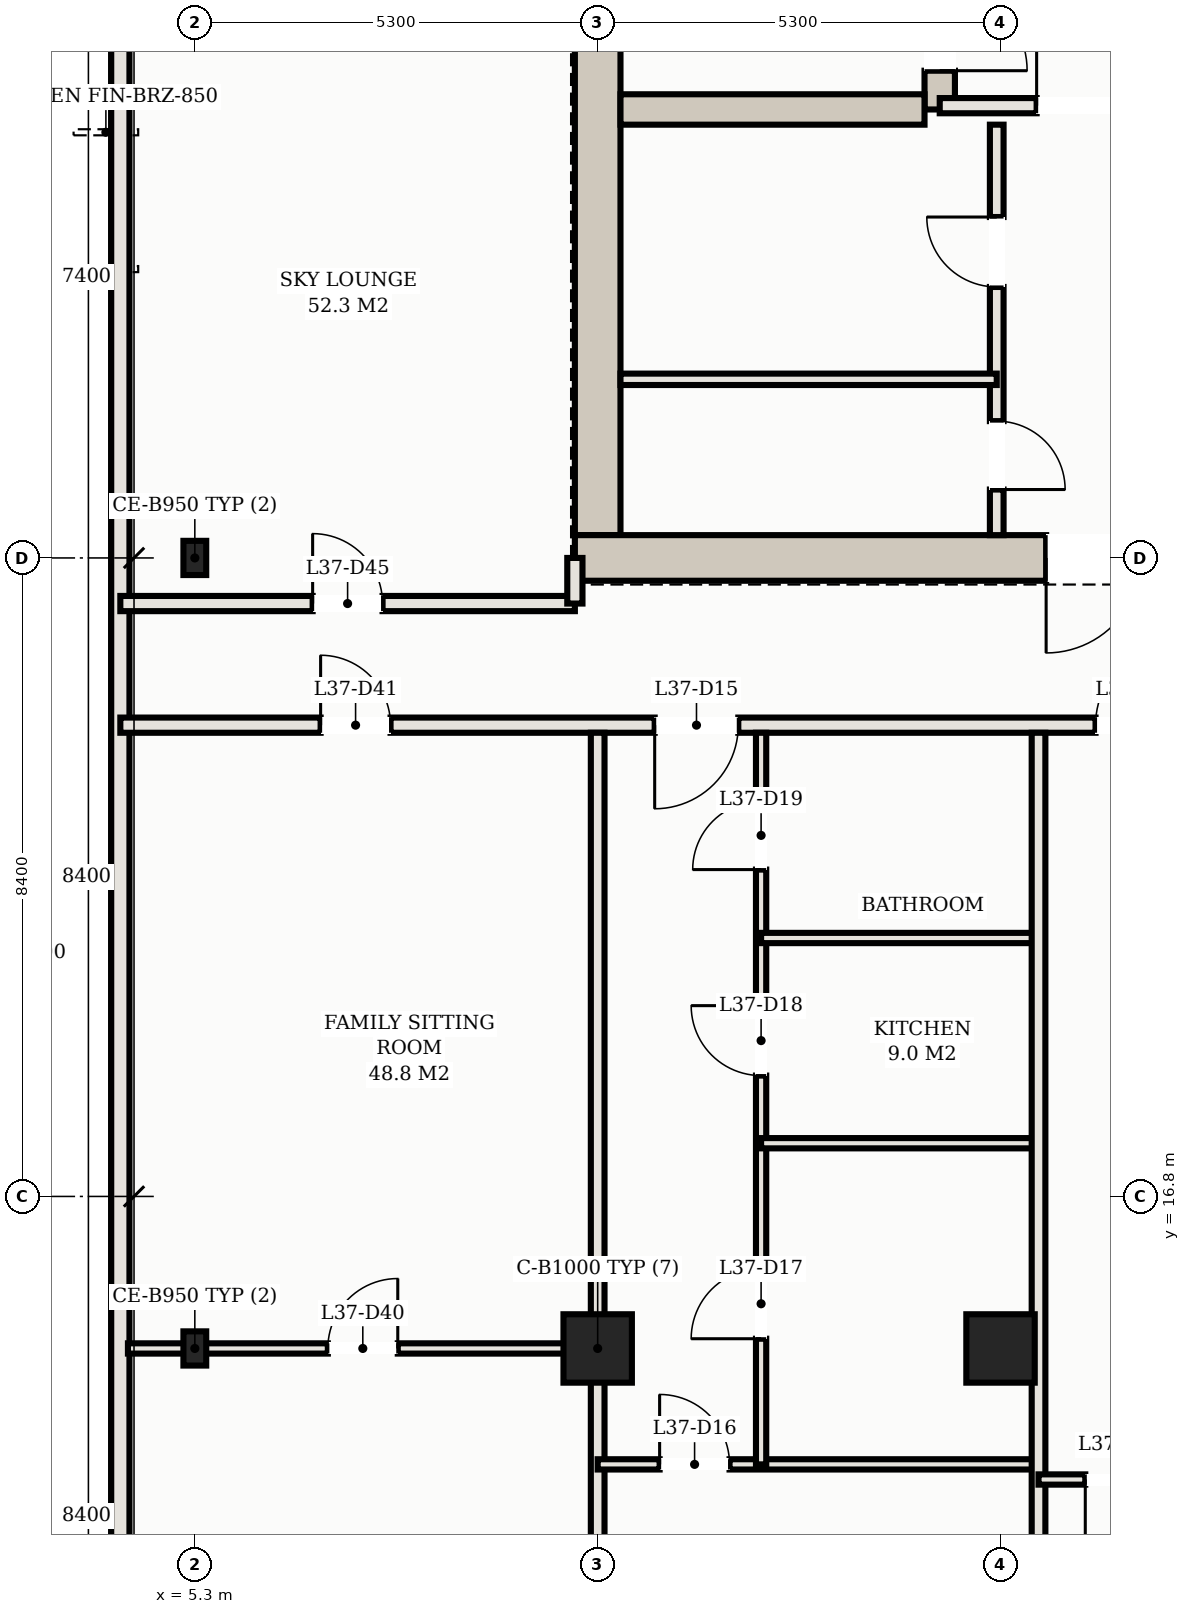
"""IFC4 building model, lengths in metres.
Left out: names, types, materials, properties, quantities, classifications, styles, units other than length and angle.
Written with IfcOpenShell. Run it as: python <this file> out.ifc"""

import sys

from ifc_helpers import new_model, si_unit, direction, frame, frame_2d, origin, origin_2d, place, context, subcontext, project, spatial, rectangle, hollow_rectangle, extrude, element, fill, save


model = new_model("IFC4")
c1 = context("Model", 3, precision=1e-05, world=origin(), true_north=direction((0.0, 1.0)))
c2 = subcontext(c1, "Body", "Model", "MODEL_VIEW")
j1 = project(units=[si_unit("LENGTHUNIT", "METRE"), si_unit("PLANEANGLEUNIT", "RADIAN")], contexts=[c1])
p1 = place(None, origin())
s1 = spatial("IfcSite", under=j1, at=p1, CompositionType="ELEMENT")
p2 = place(p1, origin())
s2 = spatial("IfcBuilding", under=s1, at=p2, CompositionType="ELEMENT")
p3 = place(p2, frame((0.0, 0.0, 139.2)))
s3 = spatial("IfcBuildingStorey", under=s2, at=p3, CompositionType="ELEMENT", Elevation=139.2)
p4 = place(p3, frame((10.6, 25.5, 0.0), z_axis=(0.0, 0.0, 1.0), x_axis=(0.0, 1.0, 0.0)))
e1 = element("IfcWall", 1, at=p4, inside=s3, PredefinedType="SHEAR", context=c2, shape_type="SweptSolid", body=[
    extrude(rectangle(XDim=14.2, YDim=0.6, at=frame_2d((7.1, 0.0))), origin(), (0.0, 0.0, 1.0), 3.1),
])
p5 = place(p3, frame((10.3, 25.2, 0.0), z_axis=(0.0, 0.0, 1.0), x_axis=(1.0, 0.0, 0.0)))
e2 = element("IfcWall", 2, at=p5, inside=s3, PredefinedType="SHEAR", context=c2, shape_type="SweptSolid", body=[
    extrude(rectangle(XDim=8.1, YDim=0.6, at=frame_2d((4.05, 0.0))), origin(), (0.0, 0.0, 1.0), 3.1),
])
p6 = place(p5, frame((6.2, 0.0, 0.0)))
e3 = element("IfcOpeningElement", 3, at=p6, cuts=e2, PredefinedType="OPENING", context=c2, shape_type="SweptSolid", body=[
    extrude(rectangle(XDim=1.25, YDim=2.2, at=frame_2d((0.625, 1.1))), frame((0.0, 0.31, 0.0), z_axis=(0.0, -1.0, 0.0), x_axis=(1.0, 0.0, 0.0)), (0.0, 0.0, 1.0), 0.62),
])
p7 = place(p3, frame((15.1, 31.1, 0.0), z_axis=(0.0, 0.0, 1.0), x_axis=(0.0, 1.0, 0.0)))
e4 = element("IfcWall", 4, at=p7, inside=s3, PredefinedType="SHEAR", context=c2, shape_type="SweptSolid", body=[
    extrude(rectangle(XDim=8.6, YDim=0.4, at=frame_2d((4.3, 0.0))), origin(), (0.0, 0.0, 1.0), 3.1),
])
p8 = place(p7, frame((0.51, 0.0, 0.0)))
e5 = element("IfcOpeningElement", 5, at=p8, cuts=e4, PredefinedType="OPENING", context=c2, shape_type="SweptSolid", body=[
    extrude(rectangle(XDim=1.15, YDim=2.2, at=frame_2d((0.575, 1.1))), frame((0.0, 0.21, 0.0), z_axis=(0.0, -1.0, 0.0), x_axis=(1.0, 0.0, 0.0)), (0.0, 0.0, 1.0), 0.42),
])
p9 = place(p3, frame((10.9, 31.1, 0.0), z_axis=(0.0, 0.0, 1.0), x_axis=(1.0, 0.0, 0.0)))
e6 = element("IfcWall", 6, at=p9, inside=s3, PredefinedType="SHEAR", context=c2, shape_type="SweptSolid", body=[
    extrude(rectangle(XDim=4.0, YDim=0.4, at=frame_2d((2.0, 0.0))), origin(), (0.0, 0.0, 1.0), 3.1),
])
for number, where, z_axis, x_axis in (
    (7, (10.6, 14.8, 0.0), (0.0, 0.0, 1.0), (1.0, 0.0, 0.0)),
    (8, (15.9, 14.8, 0.0), (0.0, 0.0, 1.0), (1.0, 0.0, 0.0)),
):
    element("IfcColumn", number, at=place(p3, frame(where, z_axis=z_axis, x_axis=x_axis)), inside=s3, PredefinedType="COLUMN", context=c2, shape_type="SweptSolid", body=[
        extrude(hollow_rectangle(XDim=0.9, YDim=0.9, WallThickness=0.032, at=origin_2d()), origin(), (0.0, 0.0, 1.0), 3.3),
    ])
for number, where, z_axis, x_axis in (
    (9, (5.3, 14.8, 0.0), (0.0, 0.0, 1.0), (1.0, 0.0, 0.0)),
    (10, (5.3, 25.2, 0.0), (0.0, 0.0, 1.0), (1.0, 0.0, 0.0)),
):
    element("IfcColumn", number, at=place(p3, frame(where, z_axis=z_axis, x_axis=x_axis)), inside=s3, PredefinedType="COLUMN", context=c2, shape_type="SweptSolid", body=[
        extrude(hollow_rectangle(XDim=0.3, YDim=0.45, WallThickness=0.016, at=origin_2d()), origin(), (0.0, 0.0, 1.0), 3.3),
    ])
p10 = place(p3, frame((4.32, 35.93, 0.0), z_axis=(0.0, 0.0, 1.0), x_axis=(0.0, -1.0, 0.0)))
e11 = element("IfcWall", 11, at=p10, inside=s3, PredefinedType="SOLIDWALL", context=c2, shape_type="SweptSolid", body=[
    extrude(rectangle(XDim=27.41, YDim=0.24, at=frame_2d((13.705, 0.0))), origin(), (0.0, 0.0, 1.0), 3.1),
])
p11 = place(p3, frame((15.1, 31.15, 0.0), z_axis=(0.0, 0.0, 1.0), x_axis=(1.0, 0.0, 0.0)))
e12 = element("IfcWall", 12, at=p11, inside=s3, PredefinedType="PARTITIONING", context=c2, shape_type="SweptSolid", body=[
    extrude(rectangle(XDim=3.25, YDim=0.2, at=frame_2d((1.625, 0.0))), origin(), (0.0, 0.0, 1.0), 2.38),
])
p12 = place(p11, frame((1.275, 0.0, 0.0)))
e13 = element("IfcOpeningElement", 13, at=p12, cuts=e12, PredefinedType="OPENING", context=c2, shape_type="SweptSolid", body=[
    extrude(rectangle(XDim=1.25, YDim=2.2, at=frame_2d((0.625, 1.1))), frame((0.0, 0.11, 0.0), z_axis=(0.0, -1.0, 0.0), x_axis=(1.0, 0.0, 0.0)), (0.0, 0.0, 1.0), 0.22),
])
p13 = place(p3, frame((15.85, 25.5, 0.0), z_axis=(0.0, 0.0, 1.0), x_axis=(0.0, 1.0, 0.0)))
e14 = element("IfcWall", 14, at=p13, inside=s3, PredefinedType="PARTITIONING", context=c2, shape_type="SweptSolid", body=[
    extrude(rectangle(XDim=5.4, YDim=0.18, at=frame_2d((2.7, 0.0))), origin(), (0.0, 0.0, 1.0), 2.38),
])
p14 = place(p13, frame((0.6, 0.0, 0.0)))
e15 = element("IfcOpeningElement", 15, at=p14, cuts=e14, PredefinedType="OPENING", context=c2, shape_type="SweptSolid", body=[
    extrude(rectangle(XDim=0.9, YDim=2.15, at=frame_2d((0.45, 1.075))), frame((0.0, 0.1, 0.0), z_axis=(0.0, -1.0, 0.0), x_axis=(1.0, 0.0, 0.0)), (0.0, 0.0, 1.0), 0.2),
])
p15 = place(p13, frame((3.265, 0.0, 0.0)))
e16 = element("IfcOpeningElement", 16, at=p15, cuts=e14, PredefinedType="OPENING", context=c2, shape_type="SweptSolid", body=[
    extrude(rectangle(XDim=0.92, YDim=2.15, at=frame_2d((0.46, 1.075))), frame((0.0, 0.1, 0.0), z_axis=(0.0, -1.0, 0.0), x_axis=(1.0, 0.0, 0.0)), (0.0, 0.0, 1.0), 0.2),
])
p16 = place(p3, frame((10.9, 27.55, 0.0), z_axis=(0.0, 0.0, 1.0), x_axis=(1.0, 0.0, 0.0)))
e17 = element("IfcWall", 17, at=p16, inside=s3, PredefinedType="PARTITIONING", context=c2, shape_type="SweptSolid", body=[
    extrude(rectangle(XDim=4.95, YDim=0.15, at=frame_2d((2.475, 0.0))), origin(), (0.0, 0.0, 1.0), 2.38),
])
p17 = place(p3, frame((4.32, 23.0, 0.0), z_axis=(0.0, 0.0, 1.0), x_axis=(1.0, 0.0, 0.0)))
e18 = element("IfcWall", 18, at=p17, inside=s3, PredefinedType="PARTITIONING", context=c2, shape_type="SweptSolid", body=[
    extrude(rectangle(XDim=44.36, YDim=0.2, at=frame_2d((22.18, 0.0))), origin(), (0.0, 0.0, 1.0), 2.38),
])
p18 = place(p17, frame((7.03, 0.0, 0.0)))
e19 = element("IfcOpeningElement", 19, at=p18, cuts=e18, PredefinedType="OPENING", context=c2, shape_type="SweptSolid", body=[
    extrude(rectangle(XDim=1.1, YDim=2.25, at=frame_2d((0.55, 1.125))), frame((0.0, 0.11, 0.0), z_axis=(0.0, -1.0, 0.0), x_axis=(1.0, 0.0, 0.0)), (0.0, 0.0, 1.0), 0.22),
])
p19 = place(p17, frame((12.83, 0.0, 0.0)))
e20 = element("IfcOpeningElement", 20, at=p19, cuts=e18, PredefinedType="OPENING", context=c2, shape_type="SweptSolid", body=[
    extrude(rectangle(XDim=1.1, YDim=2.25, at=frame_2d((0.55, 1.125))), frame((0.0, 0.11, 0.0), z_axis=(0.0, -1.0, 0.0), x_axis=(1.0, 0.0, 0.0)), (0.0, 0.0, 1.0), 0.22),
])
p20 = place(p17, frame((17.63, 0.0, 0.0)))
e21 = element("IfcOpeningElement", 21, at=p20, cuts=e18, PredefinedType="OPENING", context=c2, shape_type="SweptSolid", body=[
    extrude(rectangle(XDim=1.1, YDim=2.25, at=frame_2d((0.55, 1.125))), frame((0.0, 0.11, 0.0), z_axis=(0.0, -1.0, 0.0), x_axis=(1.0, 0.0, 0.0)), (0.0, 0.0, 1.0), 0.22),
])
p21 = place(p17, frame((28.23, 0.0, 0.0)))
e22 = element("IfcOpeningElement", 22, at=p21, cuts=e18, PredefinedType="OPENING", context=c2, shape_type="SweptSolid", body=[
    extrude(rectangle(XDim=1.1, YDim=2.25, at=frame_2d((0.55, 1.125))), frame((0.0, 0.11, 0.0), z_axis=(0.0, -1.0, 0.0), x_axis=(1.0, 0.0, 0.0)), (0.0, 0.0, 1.0), 0.22),
])
p22 = place(p17, frame((2.635, 0.0, 0.0)))
e23 = element("IfcOpeningElement", 23, at=p22, cuts=e18, PredefinedType="OPENING", context=c2, shape_type="SweptSolid", body=[
    extrude(rectangle(XDim=0.92, YDim=2.15, at=frame_2d((0.46, 1.075))), frame((0.0, 0.11, 0.0), z_axis=(0.0, -1.0, 0.0), x_axis=(1.0, 0.0, 0.0)), (0.0, 0.0, 1.0), 0.22),
])
p23 = place(p17, frame((40.805, 0.0, 0.0)))
e24 = element("IfcOpeningElement", 24, at=p23, cuts=e18, PredefinedType="OPENING", context=c2, shape_type="SweptSolid", body=[
    extrude(rectangle(XDim=0.92, YDim=2.15, at=frame_2d((0.46, 1.075))), frame((0.0, 0.11, 0.0), z_axis=(0.0, -1.0, 0.0), x_axis=(1.0, 0.0, 0.0)), (0.0, 0.0, 1.0), 0.22),
])
p24 = place(p3, frame((4.32, 24.6, 0.0), z_axis=(0.0, 0.0, 1.0), x_axis=(1.0, 0.0, 0.0)))
e25 = element("IfcWall", 25, at=p24, inside=s3, PredefinedType="PARTITIONING", context=c2, shape_type="SweptSolid", body=[
    extrude(rectangle(XDim=5.98, YDim=0.2, at=frame_2d((2.99, 0.0))), origin(), (0.0, 0.0, 1.0), 2.38),
])
p25 = place(p24, frame((2.53, 0.0, 0.0)))
e26 = element("IfcOpeningElement", 26, at=p25, cuts=e25, PredefinedType="OPENING", context=c2, shape_type="SweptSolid", body=[
    extrude(rectangle(XDim=0.92, YDim=2.15, at=frame_2d((0.46, 1.075))), frame((0.0, 0.11, 0.0), z_axis=(0.0, -1.0, 0.0), x_axis=(1.0, 0.0, 0.0)), (0.0, 0.0, 1.0), 0.22),
])
p26 = place(p3, frame((10.3, 24.6, 0.0), z_axis=(0.0, 0.0, 1.0), x_axis=(0.0, 1.0, 0.0)))
e27 = element("IfcWall", 27, at=p26, inside=s3, PredefinedType="PARTITIONING", context=c2, shape_type="SweptSolid", body=[
    extrude(rectangle(XDim=0.6, YDim=0.2, at=frame_2d((0.3, 0.0))), origin(), (0.0, 0.0, 1.0), 2.38),
])
p27 = place(p3, frame((10.6, 3.62, 0.0), z_axis=(0.0, 0.0, 1.0), x_axis=(0.0, 1.0, 0.0)))
e28 = element("IfcWall", 28, at=p27, inside=s3, PredefinedType="PARTITIONING", context=c2, shape_type="SweptSolid", body=[
    extrude(rectangle(XDim=19.28, YDim=0.18, at=frame_2d((9.64, 0.0))), origin(), (0.0, 0.0, 1.0), 2.38),
])
p28 = place(p3, frame((10.6, 13.275, 0.0), z_axis=(0.0, 0.0, 1.0), x_axis=(1.0, 0.0, 0.0)))
e29 = element("IfcWall", 29, at=p28, inside=s3, PredefinedType="PARTITIONING", context=c2, shape_type="SweptSolid", body=[
    extrude(rectangle(XDim=5.8, YDim=0.135, at=frame_2d((2.9, 0.0))), origin(), (0.0, 0.0, 1.0), 2.38),
])
p29 = place(p28, frame((0.815, 0.0, 0.0)))
e30 = element("IfcOpeningElement", 30, at=p29, cuts=e29, PredefinedType="OPENING", context=c2, shape_type="SweptSolid", body=[
    extrude(rectangle(XDim=0.92, YDim=2.15, at=frame_2d((0.46, 1.075))), frame((0.0, 0.078, 0.0), z_axis=(0.0, -1.0, 0.0), x_axis=(1.0, 0.0, 0.0)), (0.0, 0.0, 1.0), 0.155),
])
p30 = place(p3, frame((12.75, 13.275, 0.0), z_axis=(0.0, 0.0, 1.0), x_axis=(0.0, 1.0, 0.0)))
e31 = element("IfcWall", 31, at=p30, inside=s3, PredefinedType="PARTITIONING", context=c2, shape_type="SweptSolid", body=[
    extrude(rectangle(XDim=9.625, YDim=0.135, at=frame_2d((4.812, 0.0))), origin(), (0.0, 0.0, 1.0), 2.38),
])
p31 = place(p30, frame((1.653, 0.0, 0.0)))
e32 = element("IfcOpeningElement", 32, at=p31, cuts=e31, PredefinedType="OPENING", context=c2, shape_type="SweptSolid", body=[
    extrude(rectangle(XDim=0.92, YDim=2.15, at=frame_2d((0.46, 1.075))), frame((0.0, 0.078, 0.0), z_axis=(0.0, -1.0, 0.0), x_axis=(1.0, 0.0, 0.0)), (0.0, 0.0, 1.0), 0.155),
])
p32 = place(p30, frame((5.115, 0.0, 0.0)))
e33 = element("IfcOpeningElement", 33, at=p32, cuts=e31, PredefinedType="OPENING", context=c2, shape_type="SweptSolid", body=[
    extrude(rectangle(XDim=0.92, YDim=2.15, at=frame_2d((0.46, 1.075))), frame((0.0, 0.078, 0.0), z_axis=(0.0, -1.0, 0.0), x_axis=(1.0, 0.0, 0.0)), (0.0, 0.0, 1.0), 0.155),
])
p33 = place(p30, frame((7.825, 0.0, 0.0)))
e34 = element("IfcOpeningElement", 34, at=p33, cuts=e31, PredefinedType="OPENING", context=c2, shape_type="SweptSolid", body=[
    extrude(rectangle(XDim=0.9, YDim=2.15, at=frame_2d((0.45, 1.075))), frame((0.0, 0.078, 0.0), z_axis=(0.0, -1.0, 0.0), x_axis=(1.0, 0.0, 0.0)), (0.0, 0.0, 1.0), 0.155),
])
for number, where, z_axis, x_axis in (
    (35, (12.75, 17.5, 0.0), (0.0, 0.0, 1.0), (1.0, 0.0, 0.0)),
    (36, (12.75, 20.2, 0.0), (0.0, 0.0, 1.0), (1.0, 0.0, 0.0)),
):
    element("IfcWall", number, at=place(p3, frame(where, z_axis=z_axis, x_axis=x_axis)), inside=s3, PredefinedType="PARTITIONING", context=c2, shape_type="SweptSolid", body=[
        extrude(rectangle(XDim=3.65, YDim=0.135, at=frame_2d((1.825, 0.0))), origin(), (0.0, 0.0, 1.0), 2.38),
    ])
p34 = place(p3, frame((16.4, 3.62, 0.0), z_axis=(0.0, 0.0, 1.0), x_axis=(0.0, 1.0, 0.0)))
e37 = element("IfcWall", 37, at=p34, inside=s3, PredefinedType="PARTITIONING", context=c2, shape_type="SweptSolid", body=[
    extrude(rectangle(XDim=19.28, YDim=0.18, at=frame_2d((9.64, 0.0))), origin(), (0.0, 0.0, 1.0), 2.38),
])
p35 = place(p3, frame((16.4, 13.076, 0.0), z_axis=(0.0, 0.0, 1.0), x_axis=(1.0, 0.0, 0.0)))
e38 = element("IfcWall", 38, at=p35, inside=s3, PredefinedType="PARTITIONING", context=c2, shape_type="SweptSolid", body=[
    extrude(rectangle(XDim=4.8, YDim=0.135, at=frame_2d((2.4, 0.0))), origin(), (0.0, 0.0, 1.0), 2.38),
])
p36 = place(p35, frame((0.615, 0.0, 0.0)))
e39 = element("IfcOpeningElement", 39, at=p36, cuts=e38, PredefinedType="OPENING", context=c2, shape_type="SweptSolid", body=[
    extrude(rectangle(XDim=0.92, YDim=2.15, at=frame_2d((0.46, 1.075))), frame((0.0, 0.078, 0.0), z_axis=(0.0, -1.0, 0.0), x_axis=(1.0, 0.0, 0.0)), (0.0, 0.0, 1.0), 0.155),
])
p37 = place(p3, frame((4.42, 14.8, 0.0), z_axis=(0.0, 0.0, 1.0), x_axis=(1.0, 0.0, 0.0)))
e40 = element("IfcWall", 40, at=p37, inside=s3, PredefinedType="PARTITIONING", context=c2, shape_type="SweptSolid", body=[
    extrude(rectangle(XDim=6.18, YDim=0.135, at=frame_2d((3.09, 0.0))), origin(), (0.0, 0.0, 1.0), 2.38),
])
p38 = place(p37, frame((2.63, 0.0, 0.0)))
e41 = element("IfcOpeningElement", 41, at=p38, cuts=e40, PredefinedType="OPENING", context=c2, shape_type="SweptSolid", body=[
    extrude(rectangle(XDim=0.92, YDim=2.15, at=frame_2d((0.46, 1.075))), frame((0.0, 0.078, 0.0), z_axis=(0.0, -1.0, 0.0), x_axis=(1.0, 0.0, 0.0)), (0.0, 0.0, 1.0), 0.155),
])
p39 = place(p6, frame((1.25, 0.0, 0.0), z_axis=(0.0, 0.0, 1.0), x_axis=(-1.0, 0.0, 0.0)))
e42 = element("IfcDoor", 42, at=p39, inside=s3, OperationType="SINGLE_SWING_RIGHT", PredefinedType="DOOR", context=c2, shape_type="SweptSolid", body=[
    extrude(rectangle(XDim=1.25, YDim=2.2, at=frame_2d((0.625, 1.1))), frame((0.0, 0.025, 0.0), z_axis=(0.0, -1.0, 0.0), x_axis=(1.0, 0.0, 0.0)), (0.0, 0.0, 1.0), 0.05),
])
fill(e3, e42)
p40 = place(p12, origin())
e43 = element("IfcDoor", 43, at=p40, inside=s3, OperationType="SINGLE_SWING_LEFT", PredefinedType="DOOR", context=c2, shape_type="SweptSolid", body=[
    extrude(rectangle(XDim=1.25, YDim=2.2, at=frame_2d((0.625, 1.1))), frame((0.0, 0.025, 0.0), z_axis=(0.0, -1.0, 0.0), x_axis=(1.0, 0.0, 0.0)), (0.0, 0.0, 1.0), 0.05),
])
fill(e13, e43)
p41 = place(p8, frame((1.15, 0.0, 0.0), z_axis=(0.0, 0.0, 1.0), x_axis=(-1.0, 0.0, 0.0)))
e44 = element("IfcDoor", 44, at=p41, inside=s3, OperationType="SINGLE_SWING_RIGHT", PredefinedType="DOOR", context=c2, shape_type="SweptSolid", body=[
    extrude(rectangle(XDim=1.15, YDim=2.2, at=frame_2d((0.575, 1.1))), frame((0.0, 0.025, 0.0), z_axis=(0.0, -1.0, 0.0), x_axis=(1.0, 0.0, 0.0)), (0.0, 0.0, 1.0), 0.05),
])
fill(e5, e44)
p42 = place(p14, frame((0.9, 0.0, 0.0), z_axis=(0.0, 0.0, 1.0), x_axis=(-1.0, 0.0, 0.0)))
e45 = element("IfcDoor", 45, at=p42, inside=s3, OperationType="SINGLE_SWING_RIGHT", PredefinedType="DOOR", context=c2, shape_type="SweptSolid", body=[
    extrude(rectangle(XDim=0.9, YDim=2.15, at=frame_2d((0.45, 1.075))), frame((0.0, 0.025, 0.0), z_axis=(0.0, -1.0, 0.0), x_axis=(1.0, 0.0, 0.0)), (0.0, 0.0, 1.0), 0.05),
])
fill(e15, e45)
p43 = place(p15, origin())
e46 = element("IfcDoor", 46, at=p43, inside=s3, OperationType="SINGLE_SWING_RIGHT", PredefinedType="DOOR", context=c2, shape_type="SweptSolid", body=[
    extrude(rectangle(XDim=0.92, YDim=2.15, at=frame_2d((0.46, 1.075))), frame((0.0, 0.025, 0.0), z_axis=(0.0, -1.0, 0.0), x_axis=(1.0, 0.0, 0.0)), (0.0, 0.0, 1.0), 0.05),
])
fill(e16, e46)
p44 = place(p18, frame((1.1, 0.0, 0.0), z_axis=(0.0, 0.0, 1.0), x_axis=(-1.0, 0.0, 0.0)))
e47 = element("IfcDoor", 47, at=p44, inside=s3, OperationType="SINGLE_SWING_RIGHT", PredefinedType="DOOR", context=c2, shape_type="SweptSolid", body=[
    extrude(rectangle(XDim=1.1, YDim=2.25, at=frame_2d((0.55, 1.125))), frame((0.0, 0.025, 0.0), z_axis=(0.0, -1.0, 0.0), x_axis=(1.0, 0.0, 0.0)), (0.0, 0.0, 1.0), 0.05),
])
fill(e19, e47)
p45 = place(p29, origin())
e48 = element("IfcDoor", 48, at=p45, inside=s3, OperationType="SINGLE_SWING_LEFT", PredefinedType="DOOR", context=c2, shape_type="SweptSolid", body=[
    extrude(rectangle(XDim=0.92, YDim=2.15, at=frame_2d((0.46, 1.075))), frame((0.0, 0.025, 0.0), z_axis=(0.0, -1.0, 0.0), x_axis=(1.0, 0.0, 0.0)), (0.0, 0.0, 1.0), 0.05),
])
fill(e30, e48)
p46 = place(p31, origin())
e49 = element("IfcDoor", 49, at=p46, inside=s3, OperationType="SINGLE_SWING_LEFT", PredefinedType="DOOR", context=c2, shape_type="SweptSolid", body=[
    extrude(rectangle(XDim=0.92, YDim=2.15, at=frame_2d((0.46, 1.075))), frame((0.0, 0.025, 0.0), z_axis=(0.0, -1.0, 0.0), x_axis=(1.0, 0.0, 0.0)), (0.0, 0.0, 1.0), 0.05),
])
fill(e32, e49)
p47 = place(p32, origin())
e50 = element("IfcDoor", 50, at=p47, inside=s3, OperationType="SINGLE_SWING_RIGHT", PredefinedType="DOOR", context=c2, shape_type="SweptSolid", body=[
    extrude(rectangle(XDim=0.92, YDim=2.15, at=frame_2d((0.46, 1.075))), frame((0.0, 0.025, 0.0), z_axis=(0.0, -1.0, 0.0), x_axis=(1.0, 0.0, 0.0)), (0.0, 0.0, 1.0), 0.05),
])
fill(e33, e50)
p48 = place(p33, origin())
e51 = element("IfcDoor", 51, at=p48, inside=s3, OperationType="SINGLE_SWING_LEFT", PredefinedType="DOOR", context=c2, shape_type="SweptSolid", body=[
    extrude(rectangle(XDim=0.9, YDim=2.15, at=frame_2d((0.45, 1.075))), frame((0.0, 0.025, 0.0), z_axis=(0.0, -1.0, 0.0), x_axis=(1.0, 0.0, 0.0)), (0.0, 0.0, 1.0), 0.05),
])
fill(e34, e51)
p49 = place(p19, origin())
e52 = element("IfcDoor", 52, at=p49, inside=s3, OperationType="SINGLE_SWING_RIGHT", PredefinedType="DOOR", context=c2, shape_type="SweptSolid", body=[
    extrude(rectangle(XDim=1.1, YDim=2.25, at=frame_2d((0.55, 1.125))), frame((0.0, 0.025, 0.0), z_axis=(0.0, -1.0, 0.0), x_axis=(1.0, 0.0, 0.0)), (0.0, 0.0, 1.0), 0.05),
])
fill(e20, e52)
p50 = place(p36, frame((0.92, 0.0, 0.0), z_axis=(0.0, 0.0, 1.0), x_axis=(-1.0, 0.0, 0.0)))
e53 = element("IfcDoor", 53, at=p50, inside=s3, OperationType="SINGLE_SWING_RIGHT", PredefinedType="DOOR", context=c2, shape_type="SweptSolid", body=[
    extrude(rectangle(XDim=0.92, YDim=2.15, at=frame_2d((0.46, 1.075))), frame((0.0, 0.025, 0.0), z_axis=(0.0, -1.0, 0.0), x_axis=(1.0, 0.0, 0.0)), (0.0, 0.0, 1.0), 0.05),
])
fill(e39, e53)
p51 = place(p38, origin())
e54 = element("IfcDoor", 54, at=p51, inside=s3, OperationType="SINGLE_SWING_RIGHT", PredefinedType="DOOR", context=c2, shape_type="SweptSolid", body=[
    extrude(rectangle(XDim=0.92, YDim=2.15, at=frame_2d((0.46, 1.075))), frame((0.0, 0.025, 0.0), z_axis=(0.0, -1.0, 0.0), x_axis=(1.0, 0.0, 0.0)), (0.0, 0.0, 1.0), 0.05),
])
fill(e41, e54)
p52 = place(p22, origin())
e55 = element("IfcDoor", 55, at=p52, inside=s3, OperationType="SINGLE_SWING_LEFT", PredefinedType="DOOR", context=c2, shape_type="SweptSolid", body=[
    extrude(rectangle(XDim=0.92, YDim=2.15, at=frame_2d((0.46, 1.075))), frame((0.0, 0.025, 0.0), z_axis=(0.0, -1.0, 0.0), x_axis=(1.0, 0.0, 0.0)), (0.0, 0.0, 1.0), 0.05),
])
fill(e23, e55)
p53 = place(p25, origin())
e56 = element("IfcDoor", 56, at=p53, inside=s3, OperationType="SINGLE_SWING_LEFT", PredefinedType="DOOR", context=c2, shape_type="SweptSolid", body=[
    extrude(rectangle(XDim=0.92, YDim=2.15, at=frame_2d((0.46, 1.075))), frame((0.0, 0.025, 0.0), z_axis=(0.0, -1.0, 0.0), x_axis=(1.0, 0.0, 0.0)), (0.0, 0.0, 1.0), 0.05),
])
fill(e26, e56)
save(model, sys.argv[1])
